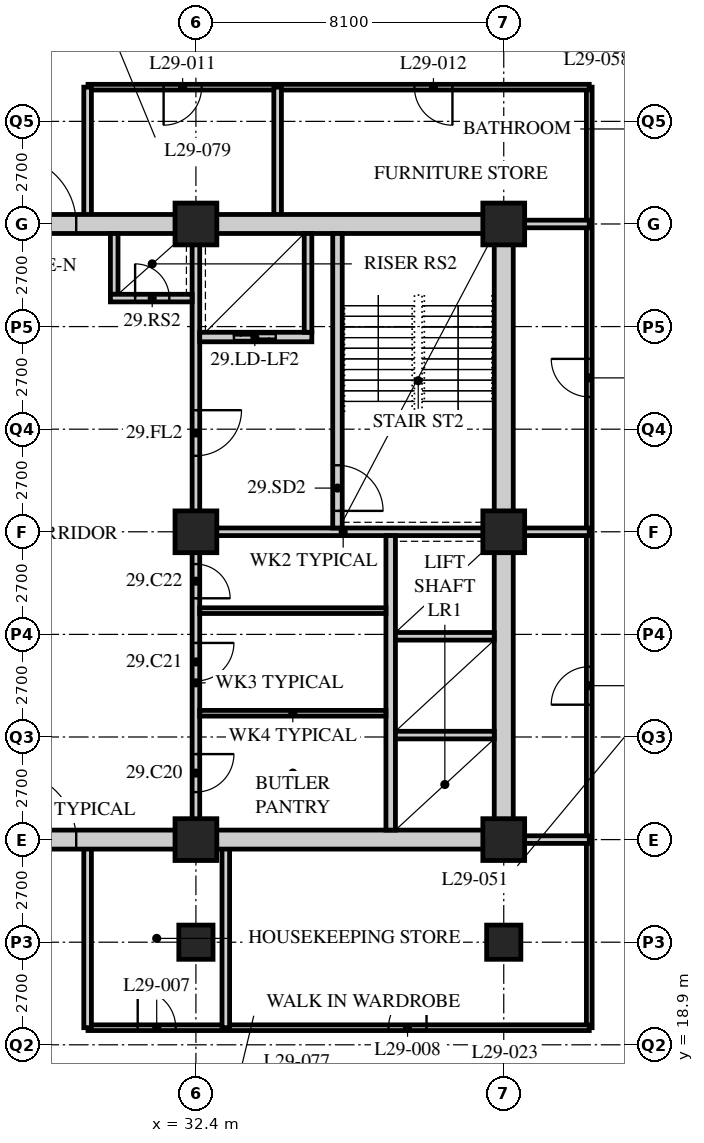
"""IFC4 building model, lengths in metres.
Left out: names, types, materials, properties, quantities, classifications, styles, units other than length and angle.
Written with IfcOpenShell. Run it as: python <this file> out.ifc"""

import sys

from ifc_helpers import new_model, si_unit, direction, frame, frame_2d, origin, origin_2d, place, context, subcontext, project, spatial, rectangle, hollow_rectangle, extrude, element, fill, save


model = new_model("IFC4")
c1 = context("Model", 3, precision=1e-05, world=origin(), true_north=direction((0.0, 1.0)))
c2 = subcontext(c1, "Body", "Model", "MODEL_VIEW")
j1 = project(units=[si_unit("LENGTHUNIT", "METRE"), si_unit("PLANEANGLEUNIT", "RADIAN")], contexts=[c1])
p1 = place(None, origin())
s1 = spatial("IfcSite", under=j1, at=p1, CompositionType="ELEMENT")
p2 = place(p1, origin())
s2 = spatial("IfcBuilding", under=s1, at=p2, CompositionType="ELEMENT")
p3 = place(p2, frame((0.0, 0.0, 117.0)))
s3 = spatial("IfcBuildingStorey", under=s2, at=p3, CompositionType="ELEMENT", Elevation=117.0)
p4 = place(p3, frame((32.4, 21.6, 0.0), z_axis=(0.0, 0.0, 1.0), x_axis=(1.0, 0.0, 0.0)))
e1 = element("IfcColumn", 1, at=p4, inside=s3, PredefinedType="COLUMN", context=c2, shape_type="SweptSolid", body=[
    extrude(hollow_rectangle(XDim=0.9, YDim=0.9, WallThickness=0.09, at=origin_2d()), origin(), (0.0, 0.0, 1.0), 3.4),
])
for number, where, z_axis, x_axis in (
    (2, (32.4, 24.3, 0.0), (0.0, 0.0, 1.0), (1.0, 0.0, 0.0)),
    (3, (32.4, 32.4, 0.0), (0.0, 0.0, 1.0), (1.0, 0.0, 0.0)),
    (4, (32.4, 40.5, 0.0), (0.0, 0.0, 1.0), (1.0, 0.0, 0.0)),
):
    element("IfcColumn", number, at=place(p3, frame(where, z_axis=z_axis, x_axis=x_axis)), inside=s3, PredefinedType="COLUMN", context=c2, shape_type="SweptSolid", body=[
        extrude(hollow_rectangle(XDim=1.1, YDim=1.1, WallThickness=0.1, at=origin_2d()), origin(), (0.0, 0.0, 1.0), 3.4),
    ])
p5 = place(p3, frame((40.5, 21.6, 0.0), z_axis=(0.0, 0.0, 1.0), x_axis=(1.0, 0.0, 0.0)))
e5 = element("IfcColumn", 5, at=p5, inside=s3, PredefinedType="COLUMN", context=c2, shape_type="SweptSolid", body=[
    extrude(hollow_rectangle(XDim=0.9, YDim=0.9, WallThickness=0.09, at=origin_2d()), origin(), (0.0, 0.0, 1.0), 3.4),
])
for number, where, z_axis, x_axis in (
    (6, (40.5, 24.3, 0.0), (0.0, 0.0, 1.0), (1.0, 0.0, 0.0)),
    (7, (40.5, 32.4, 0.0), (0.0, 0.0, 1.0), (1.0, 0.0, 0.0)),
    (8, (40.5, 40.5, 0.0), (0.0, 0.0, 1.0), (1.0, 0.0, 0.0)),
):
    element("IfcColumn", number, at=place(p3, frame(where, z_axis=z_axis, x_axis=x_axis)), inside=s3, PredefinedType="COLUMN", context=c2, shape_type="SweptSolid", body=[
        extrude(hollow_rectangle(XDim=1.1, YDim=1.1, WallThickness=0.1, at=origin_2d()), origin(), (0.0, 0.0, 1.0), 3.4),
    ])
p6 = place(p3, frame((42.75, 19.35, 0.0), z_axis=(0.0, 0.0, 1.0), x_axis=(0.0, 1.0, 0.0)))
e9 = element("IfcWall", 9, at=p6, inside=s3, PredefinedType="PARTITIONING", context=c2, shape_type="SweptSolid", body=[
    extrude(rectangle(XDim=24.75, YDim=0.15, at=frame_2d((12.375, 0.0))), origin(), (0.0, 0.0, 1.0), 3.19),
])
p7 = place(p6, frame((8.5, 0.0, 0.0)))
e10 = element("IfcOpeningElement", 10, at=p7, cuts=e9, PredefinedType="OPENING", context=c2, shape_type="SweptSolid", body=[
    extrude(rectangle(XDim=1.0, YDim=2.1, at=frame_2d((0.5, 1.05))), frame((0.0, 0.085, 0.0), z_axis=(0.0, -1.0, 0.0), x_axis=(1.0, 0.0, 0.0)), (0.0, 0.0, 1.0), 0.17),
])
p8 = place(p6, frame((16.6, 0.0, 0.0)))
e11 = element("IfcOpeningElement", 11, at=p8, cuts=e9, PredefinedType="OPENING", context=c2, shape_type="SweptSolid", body=[
    extrude(rectangle(XDim=1.0, YDim=2.1, at=frame_2d((0.5, 1.05))), frame((0.0, 0.085, 0.0), z_axis=(0.0, -1.0, 0.0), x_axis=(1.0, 0.0, 0.0)), (0.0, 0.0, 1.0), 0.17),
])
p9 = place(p3, frame((42.75, 44.1, 0.0), z_axis=(0.0, 0.0, 1.0), x_axis=(-1.0, 0.0, 0.0)))
e12 = element("IfcWall", 12, at=p9, inside=s3, PredefinedType="PARTITIONING", context=c2, shape_type="SweptSolid", body=[
    extrude(rectangle(XDim=13.19, YDim=0.15, at=frame_2d((6.595, 0.0))), origin(), (0.0, 0.0, 1.0), 3.19),
])
p10 = place(p9, frame((10.2, 0.0, 0.0)))
e13 = element("IfcOpeningElement", 13, at=p10, cuts=e12, PredefinedType="OPENING", context=c2, shape_type="SweptSolid", body=[
    extrude(rectangle(XDim=1.0, YDim=2.1, at=frame_2d((0.5, 1.05))), frame((0.0, 0.085, 0.0), z_axis=(0.0, -1.0, 0.0), x_axis=(1.0, 0.0, 0.0)), (0.0, 0.0, 1.0), 0.17),
])
p11 = place(p9, frame((3.6, 0.0, 0.0)))
e14 = element("IfcOpeningElement", 14, at=p11, cuts=e12, PredefinedType="OPENING", context=c2, shape_type="SweptSolid", body=[
    extrude(rectangle(XDim=1.0, YDim=2.1, at=frame_2d((0.5, 1.05))), frame((0.0, 0.085, 0.0), z_axis=(0.0, -1.0, 0.0), x_axis=(1.0, 0.0, 0.0)), (0.0, 0.0, 1.0), 0.17),
])
p12 = place(p3, frame((29.56, 19.35, 0.0), z_axis=(0.0, 0.0, 1.0), x_axis=(1.0, 0.0, 0.0)))
e15 = element("IfcWall", 15, at=p12, inside=s3, PredefinedType="PARTITIONING", context=c2, shape_type="SweptSolid", body=[
    extrude(rectangle(XDim=13.19, YDim=0.15, at=frame_2d((6.595, 0.0))), origin(), (0.0, 0.0, 1.0), 3.19),
])
p13 = place(p12, frame((1.308, 0.0, 0.0)))
e16 = element("IfcOpeningElement", 16, at=p13, cuts=e15, PredefinedType="OPENING", context=c2, shape_type="SweptSolid", body=[
    extrude(rectangle(XDim=1.0, YDim=2.1, at=frame_2d((0.5, 1.05))), frame((0.0, 0.085, 0.0), z_axis=(0.0, -1.0, 0.0), x_axis=(1.0, 0.0, 0.0)), (0.0, 0.0, 1.0), 0.17),
])
p14 = place(p12, frame((7.908, 0.0, 0.0)))
e17 = element("IfcOpeningElement", 17, at=p14, cuts=e15, PredefinedType="OPENING", context=c2, shape_type="SweptSolid", body=[
    extrude(rectangle(XDim=1.0, YDim=2.1, at=frame_2d((0.5, 1.05))), frame((0.0, 0.085, 0.0), z_axis=(0.0, -1.0, 0.0), x_axis=(1.0, 0.0, 0.0)), (0.0, 0.0, 1.0), 0.17),
])
p15 = place(p3, frame((40.5, 32.4, 0.0), z_axis=(0.0, 0.0, 1.0), x_axis=(1.0, 0.0, 0.0)))
e18 = element("IfcWall", 18, at=p15, inside=s3, PredefinedType="SOLIDWALL", context=c2, shape_type="SweptSolid", body=[
    extrude(rectangle(XDim=2.25, YDim=0.2, at=frame_2d((1.125, 0.0))), origin(), (0.0, 0.0, 1.0), 3.19),
])
for number, where, z_axis, x_axis in (
    (19, (33.186, 19.35, 0.0), (0.0, 0.0, 1.0), (0.0, 1.0, 0.0)),
    (20, (29.55, 19.35, 0.0), (0.0, 0.0, 1.0), (0.0, 1.0, 0.0)),
):
    element("IfcWall", number, at=place(p3, frame(where, z_axis=z_axis, x_axis=x_axis)), inside=s3, PredefinedType="SOLIDWALL", context=c2, shape_type="SweptSolid", body=[
        extrude(rectangle(XDim=4.95, YDim=0.2, at=frame_2d((2.475, 0.0))), origin(), (0.0, 0.0, 1.0), 3.19),
    ])
for number, where, z_axis, x_axis in (
    (21, (34.55, 44.1, 0.0), (0.0, 0.0, 1.0), (0.0, -1.0, 0.0)),
    (22, (29.55, 40.5, 0.0), (0.0, 0.0, 1.0), (0.0, 1.0, 0.0)),
):
    element("IfcWall", number, at=place(p3, frame(where, z_axis=z_axis, x_axis=x_axis)), inside=s3, PredefinedType="SOLIDWALL", context=c2, shape_type="SweptSolid", body=[
        extrude(rectangle(XDim=3.6, YDim=0.2, at=frame_2d((1.8, 0.0))), origin(), (0.0, 0.0, 1.0), 3.19),
    ])
for number, where, z_axis, x_axis in (
    (23, (40.5, 24.3, 0.0), (0.0, 0.0, 1.0), (1.0, 0.0, 0.0)),
    (24, (40.5, 40.5, 0.0), (0.0, 0.0, 1.0), (1.0, 0.0, 0.0)),
):
    element("IfcWall", number, at=place(p3, frame(where, z_axis=z_axis, x_axis=x_axis)), inside=s3, PredefinedType="SOLIDWALL", context=c2, shape_type="SweptSolid", body=[
        extrude(rectangle(XDim=2.25, YDim=0.2, at=frame_2d((1.125, 0.0))), origin(), (0.0, 0.0, 1.0), 3.19),
    ])
p16 = place(p3, frame((15.95, 24.3, 0.0), z_axis=(0.0, 0.0, 1.0), x_axis=(1.0, 0.0, 0.0)))
e25 = element("IfcWall", 25, at=p16, inside=s3, PredefinedType="SOLIDWALL", context=c2, shape_type="SweptSolid", body=[
    extrude(rectangle(XDim=24.8, YDim=0.5, at=frame_2d((12.4, 0.0))), origin(), (0.0, 0.0, 1.0), 2.54),
])
p17 = place(p16, frame((11.5, 0.0, 0.0)))
e26 = element("IfcOpeningElement", 26, at=p17, cuts=e25, PredefinedType="OPENING", context=c2, shape_type="SweptSolid", body=[
    extrude(rectangle(XDim=1.8, YDim=2.4, at=frame_2d((0.9, 1.2))), frame((0.0, 0.26, 0.0), z_axis=(0.0, -1.0, 0.0), x_axis=(1.0, 0.0, 0.0)), (0.0, 0.0, 1.0), 0.52),
])
p18 = place(p3, frame((15.95, 40.5, 0.0), z_axis=(0.0, 0.0, 1.0), x_axis=(1.0, 0.0, 0.0)))
e27 = element("IfcWall", 27, at=p18, inside=s3, PredefinedType="SOLIDWALL", context=c2, shape_type="SweptSolid", body=[
    extrude(rectangle(XDim=24.8, YDim=0.5, at=frame_2d((12.4, 0.0))), origin(), (0.0, 0.0, 1.0), 2.54),
])
p19 = place(p18, frame((11.5, 0.0, 0.0)))
e28 = element("IfcOpeningElement", 28, at=p19, cuts=e27, PredefinedType="OPENING", context=c2, shape_type="SweptSolid", body=[
    extrude(rectangle(XDim=1.8, YDim=2.4, at=frame_2d((0.9, 1.2))), frame((0.0, 0.26, 0.0), z_axis=(0.0, -1.0, 0.0), x_axis=(1.0, 0.0, 0.0)), (0.0, 0.0, 1.0), 0.52),
])
p20 = place(p3, frame((40.5, 24.55, 0.0), z_axis=(0.0, 0.0, 1.0), x_axis=(0.0, 1.0, 0.0)))
e29 = element("IfcWall", 29, at=p20, inside=s3, PredefinedType="SOLIDWALL", context=c2, shape_type="SweptSolid", body=[
    extrude(rectangle(XDim=15.7, YDim=0.5, at=frame_2d((7.85, 0.0))), origin(), (0.0, 0.0, 1.0), 2.578),
])
p21 = place(p3, frame((32.3, 32.4, 0.0), z_axis=(0.0, 0.0, 1.0), x_axis=(1.0, 0.0, 0.0)))
e30 = element("IfcWall", 30, at=p21, inside=s3, PredefinedType="SOLIDWALL", context=c2, shape_type="SweptSolid", body=[
    extrude(rectangle(XDim=7.95, YDim=0.2, at=frame_2d((3.975, 0.0))), origin(), (0.0, 0.0, 1.0), 2.578),
])
p22 = place(p3, frame((32.4, 32.5, 0.0), z_axis=(0.0, 0.0, 1.0), x_axis=(0.0, 1.0, 0.0)))
e31 = element("IfcWall", 31, at=p22, inside=s3, PredefinedType="SOLIDWALL", context=c2, shape_type="SweptSolid", body=[
    extrude(rectangle(XDim=7.75, YDim=0.2, at=frame_2d((3.875, 0.0))), origin(), (0.0, 0.0, 1.0), 2.578),
])
p23 = place(p22, frame((1.9, 0.0, 0.0)))
e32 = element("IfcOpeningElement", 32, at=p23, cuts=e31, PredefinedType="OPENING", context=c2, shape_type="SweptSolid", body=[
    extrude(rectangle(XDim=1.2, YDim=2.1, at=frame_2d((0.6, 1.05))), frame((0.0, 0.11, 0.0), z_axis=(0.0, -1.0, 0.0), x_axis=(1.0, 0.0, 0.0)), (0.0, 0.0, 1.0), 0.22),
])
p24 = place(p3, frame((37.525, 24.55, 0.0), z_axis=(0.0, 0.0, 1.0), x_axis=(0.0, 1.0, 0.0)))
e33 = element("IfcWall", 33, at=p24, inside=s3, PredefinedType="SOLIDWALL", context=c2, shape_type="SweptSolid", body=[
    extrude(rectangle(XDim=7.75, YDim=0.25, at=frame_2d((3.875, 0.0))), origin(), (0.0, 0.0, 1.0), 3.19),
])
for number, where, z_axis, x_axis in (
    (34, (37.65, 27.05, 0.0), (0.0, 0.0, 1.0), (1.0, 0.0, 0.0)),
    (35, (37.65, 29.65, 0.0), (0.0, 0.0, 1.0), (1.0, 0.0, 0.0)),
):
    element("IfcWall", number, at=place(p3, frame(where, z_axis=z_axis, x_axis=x_axis)), inside=s3, PredefinedType="SOLIDWALL", context=c2, shape_type="SweptSolid", body=[
        extrude(rectangle(XDim=2.6, YDim=0.2, at=frame_2d((1.3, 0.0))), origin(), (0.0, 0.0, 1.0), 3.19),
    ])
p25 = place(p3, frame((36.125, 32.5, 0.0), z_axis=(0.0, 0.0, 1.0), x_axis=(0.0, 1.0, 0.0)))
e36 = element("IfcWall", 36, at=p25, inside=s3, PredefinedType="SOLIDWALL", context=c2, shape_type="SweptSolid", body=[
    extrude(rectangle(XDim=7.75, YDim=0.25, at=frame_2d((3.875, 0.0))), origin(), (0.0, 0.0, 1.0), 3.19),
])
p26 = place(p25, frame((0.45, 0.0, 0.0)))
e37 = element("IfcOpeningElement", 37, at=p26, cuts=e36, PredefinedType="OPENING", context=c2, shape_type="SweptSolid", body=[
    extrude(rectangle(XDim=1.2, YDim=2.1, at=frame_2d((0.6, 1.05))), frame((0.0, 0.135, 0.0), z_axis=(0.0, -1.0, 0.0), x_axis=(1.0, 0.0, 0.0)), (0.0, 0.0, 1.0), 0.27),
])
p27 = place(p3, frame((32.5, 37.525, 0.0), z_axis=(0.0, 0.0, 1.0), x_axis=(1.0, 0.0, 0.0)))
e38 = element("IfcWall", 38, at=p27, inside=s3, PredefinedType="SOLIDWALL", context=c2, shape_type="SweptSolid", body=[
    extrude(rectangle(XDim=2.95, YDim=0.25, at=frame_2d((1.475, 0.0))), origin(), (0.0, 0.0, 1.0), 3.19),
])
p28 = place(p27, frame((0.9, 0.0, 0.0)))
e39 = element("IfcOpeningElement", 39, at=p28, cuts=e38, PredefinedType="OPENING", context=c2, shape_type="SweptSolid", body=[
    extrude(rectangle(XDim=1.1, YDim=2.4, at=frame_2d((0.55, 1.2))), frame((0.0, 0.135, 0.0), z_axis=(0.0, -1.0, 0.0), x_axis=(1.0, 0.0, 0.0)), (0.0, 0.0, 1.0), 0.27),
])
p29 = place(p3, frame((35.35, 37.65, 0.0), z_axis=(0.0, 0.0, 1.0), x_axis=(0.0, 1.0, 0.0)))
e40 = element("IfcWall", 40, at=p29, inside=s3, PredefinedType="SOLIDWALL", context=c2, shape_type="SweptSolid", body=[
    extrude(rectangle(XDim=2.6, YDim=0.2, at=frame_2d((1.3, 0.0))), origin(), (0.0, 0.0, 1.0), 3.19),
])
p30 = place(p3, frame((30.25, 38.65, 0.0), z_axis=(0.0, 0.0, 1.0), x_axis=(0.0, 1.0, 0.0)))
e41 = element("IfcWall", 41, at=p30, inside=s3, PredefinedType="SOLIDWALL", context=c2, shape_type="SweptSolid", body=[
    extrude(rectangle(XDim=1.6, YDim=0.2, at=frame_2d((0.8, 0.0))), origin(), (0.0, 0.0, 1.0), 3.19),
])
p31 = place(p3, frame((30.15, 38.55, 0.0), z_axis=(0.0, 0.0, 1.0), x_axis=(1.0, 0.0, 0.0)))
e42 = element("IfcWall", 42, at=p31, inside=s3, PredefinedType="SOLIDWALL", context=c2, shape_type="SweptSolid", body=[
    extrude(rectangle(XDim=2.15, YDim=0.2, at=frame_2d((1.075, 0.0))), origin(), (0.0, 0.0, 1.0), 3.19),
])
p32 = place(p31, frame((0.65, 0.0, 0.0)))
e43 = element("IfcOpeningElement", 43, at=p32, cuts=e42, PredefinedType="OPENING", context=c2, shape_type="SweptSolid", body=[
    extrude(rectangle(XDim=0.9, YDim=2.1, at=frame_2d((0.45, 1.05))), frame((0.0, 0.11, 0.0), z_axis=(0.0, -1.0, 0.0), x_axis=(1.0, 0.0, 0.0)), (0.0, 0.0, 1.0), 0.22),
])
p33 = place(p3, frame((32.4, 24.55, 0.0), z_axis=(0.0, 0.0, 1.0), x_axis=(0.0, 1.0, 0.0)))
e44 = element("IfcWall", 44, at=p33, inside=s3, PredefinedType="PARTITIONING", context=c2, shape_type="SweptSolid", body=[
    extrude(rectangle(XDim=7.75, YDim=0.2, at=frame_2d((3.875, 0.0))), origin(), (0.0, 0.0, 1.0), 2.578),
])
p34 = place(p33, frame((1.0, 0.0, 0.0)))
e45 = element("IfcOpeningElement", 45, at=p34, cuts=e44, PredefinedType="OPENING", context=c2, shape_type="SweptSolid", body=[
    extrude(rectangle(XDim=1.0, YDim=2.1, at=frame_2d((0.5, 1.05))), frame((0.0, 0.11, 0.0), z_axis=(0.0, -1.0, 0.0), x_axis=(1.0, 0.0, 0.0)), (0.0, 0.0, 1.0), 0.22),
])
p35 = place(p33, frame((3.925, 0.0, 0.0)))
e46 = element("IfcOpeningElement", 46, at=p35, cuts=e44, PredefinedType="OPENING", context=c2, shape_type="SweptSolid", body=[
    extrude(rectangle(XDim=1.0, YDim=2.1, at=frame_2d((0.5, 1.05))), frame((0.0, 0.11, 0.0), z_axis=(0.0, -1.0, 0.0), x_axis=(1.0, 0.0, 0.0)), (0.0, 0.0, 1.0), 0.22),
])
p36 = place(p33, frame((6.1, 0.0, 0.0)))
e47 = element("IfcOpeningElement", 47, at=p36, cuts=e44, PredefinedType="OPENING", context=c2, shape_type="SweptSolid", body=[
    extrude(rectangle(XDim=0.9, YDim=2.1, at=frame_2d((0.45, 1.05))), frame((0.0, 0.11, 0.0), z_axis=(0.0, -1.0, 0.0), x_axis=(1.0, 0.0, 0.0)), (0.0, 0.0, 1.0), 0.22),
])
for number, where, z_axis, x_axis in (
    (48, (32.5, 27.625, 0.0), (0.0, 0.0, 1.0), (1.0, 0.0, 0.0)),
    (49, (32.5, 30.325, 0.0), (0.0, 0.0, 1.0), (1.0, 0.0, 0.0)),
):
    element("IfcWall", number, at=place(p3, frame(where, z_axis=z_axis, x_axis=x_axis)), inside=s3, PredefinedType="PARTITIONING", context=c2, shape_type="SweptSolid", body=[
        extrude(rectangle(XDim=4.9, YDim=0.15, at=frame_2d((2.45, 0.0))), origin(), (0.0, 0.0, 1.0), 3.19),
    ])
p37 = place(p7, origin())
e50 = element("IfcDoor", 50, at=p37, inside=s3, OperationType="SINGLE_SWING_LEFT", PredefinedType="DOOR", context=c2, shape_type="SweptSolid", body=[
    extrude(rectangle(XDim=1.0, YDim=2.1, at=frame_2d((0.5, 1.05))), frame((0.0, 0.025, 0.0), z_axis=(0.0, -1.0, 0.0), x_axis=(1.0, 0.0, 0.0)), (0.0, 0.0, 1.0), 0.05),
])
fill(e10, e50)
p38 = place(p8, origin())
e51 = element("IfcDoor", 51, at=p38, inside=s3, OperationType="SINGLE_SWING_RIGHT", PredefinedType="DOOR", context=c2, shape_type="SweptSolid", body=[
    extrude(rectangle(XDim=1.0, YDim=2.1, at=frame_2d((0.5, 1.05))), frame((0.0, 0.025, 0.0), z_axis=(0.0, -1.0, 0.0), x_axis=(1.0, 0.0, 0.0)), (0.0, 0.0, 1.0), 0.05),
])
fill(e11, e51)
p39 = place(p13, origin())
e52 = element("IfcDoor", 52, at=p39, inside=s3, OperationType="SINGLE_SWING_LEFT", PredefinedType="DOOR", context=c2, shape_type="SweptSolid", body=[
    extrude(rectangle(XDim=1.0, YDim=2.1, at=frame_2d((0.5, 1.05))), frame((0.0, 0.025, 0.0), z_axis=(0.0, -1.0, 0.0), x_axis=(1.0, 0.0, 0.0)), (0.0, 0.0, 1.0), 0.05),
])
fill(e16, e52)
p40 = place(p14, origin())
e53 = element("IfcDoor", 53, at=p40, inside=s3, OperationType="SINGLE_SWING_RIGHT", PredefinedType="DOOR", context=c2, shape_type="SweptSolid", body=[
    extrude(rectangle(XDim=1.0, YDim=2.1, at=frame_2d((0.5, 1.05))), frame((0.0, 0.025, 0.0), z_axis=(0.0, -1.0, 0.0), x_axis=(1.0, 0.0, 0.0)), (0.0, 0.0, 1.0), 0.05),
])
fill(e17, e53)
p41 = place(p10, origin())
e54 = element("IfcDoor", 54, at=p41, inside=s3, OperationType="SINGLE_SWING_RIGHT", PredefinedType="DOOR", context=c2, shape_type="SweptSolid", body=[
    extrude(rectangle(XDim=1.0, YDim=2.1, at=frame_2d((0.5, 1.05))), frame((0.0, 0.025, 0.0), z_axis=(0.0, -1.0, 0.0), x_axis=(1.0, 0.0, 0.0)), (0.0, 0.0, 1.0), 0.05),
])
fill(e13, e54)
p42 = place(p11, origin())
e55 = element("IfcDoor", 55, at=p42, inside=s3, OperationType="SINGLE_SWING_LEFT", PredefinedType="DOOR", context=c2, shape_type="SweptSolid", body=[
    extrude(rectangle(XDim=1.0, YDim=2.1, at=frame_2d((0.5, 1.05))), frame((0.0, 0.025, 0.0), z_axis=(0.0, -1.0, 0.0), x_axis=(1.0, 0.0, 0.0)), (0.0, 0.0, 1.0), 0.05),
])
fill(e14, e55)
p43 = place(p34, origin())
e56 = element("IfcDoor", 56, at=p43, inside=s3, OperationType="SINGLE_SWING_LEFT", PredefinedType="DOOR", context=c2, shape_type="SweptSolid", body=[
    extrude(rectangle(XDim=1.0, YDim=2.1, at=frame_2d((0.5, 1.05))), frame((0.0, 0.025, 0.0), z_axis=(0.0, -1.0, 0.0), x_axis=(1.0, 0.0, 0.0)), (0.0, 0.0, 1.0), 0.05),
])
fill(e45, e56)
p44 = place(p35, origin())
e57 = element("IfcDoor", 57, at=p44, inside=s3, OperationType="SINGLE_SWING_LEFT", PredefinedType="DOOR", context=c2, shape_type="SweptSolid", body=[
    extrude(rectangle(XDim=1.0, YDim=2.1, at=frame_2d((0.5, 1.05))), frame((0.0, 0.025, 0.0), z_axis=(0.0, -1.0, 0.0), x_axis=(1.0, 0.0, 0.0)), (0.0, 0.0, 1.0), 0.05),
])
fill(e46, e57)
p45 = place(p36, origin())
e58 = element("IfcDoor", 58, at=p45, inside=s3, OperationType="SINGLE_SWING_RIGHT", PredefinedType="DOOR", context=c2, shape_type="SweptSolid", body=[
    extrude(rectangle(XDim=0.9, YDim=2.1, at=frame_2d((0.45, 1.05))), frame((0.0, 0.025, 0.0), z_axis=(0.0, -1.0, 0.0), x_axis=(1.0, 0.0, 0.0)), (0.0, 0.0, 1.0), 0.05),
])
fill(e47, e58)
p46 = place(p26, origin())
e59 = element("IfcDoor", 59, at=p46, inside=s3, OperationType="SINGLE_SWING_RIGHT", PredefinedType="DOOR", context=c2, shape_type="SweptSolid", body=[
    extrude(rectangle(XDim=1.2, YDim=2.1, at=frame_2d((0.6, 1.05))), frame((0.0, 0.025, 0.0), z_axis=(0.0, -1.0, 0.0), x_axis=(1.0, 0.0, 0.0)), (0.0, 0.0, 1.0), 0.05),
])
fill(e37, e59)
p47 = place(p23, origin())
e60 = element("IfcDoor", 60, at=p47, inside=s3, OperationType="SINGLE_SWING_LEFT", PredefinedType="DOOR", context=c2, shape_type="SweptSolid", body=[
    extrude(rectangle(XDim=1.2, YDim=2.1, at=frame_2d((0.6, 1.05))), frame((0.0, 0.025, 0.0), z_axis=(0.0, -1.0, 0.0), x_axis=(1.0, 0.0, 0.0)), (0.0, 0.0, 1.0), 0.05),
])
fill(e32, e60)
p48 = place(p32, origin())
e61 = element("IfcDoor", 61, at=p48, inside=s3, OperationType="SINGLE_SWING_LEFT", PredefinedType="DOOR", context=c2, shape_type="SweptSolid", body=[
    extrude(rectangle(XDim=0.9, YDim=2.1, at=frame_2d((0.45, 1.05))), frame((0.0, 0.025, 0.0), z_axis=(0.0, -1.0, 0.0), x_axis=(1.0, 0.0, 0.0)), (0.0, 0.0, 1.0), 0.05),
])
fill(e43, e61)
p49 = place(p28, origin())
e62 = element("IfcDoor", 62, at=p49, inside=s3, OperationType="DOUBLE_DOOR_SLIDING", PredefinedType="DOOR", context=c2, shape_type="SweptSolid", body=[
    extrude(rectangle(XDim=1.1, YDim=2.4, at=frame_2d((0.55, 1.2))), frame((0.0, 0.025, 0.0), z_axis=(0.0, -1.0, 0.0), x_axis=(1.0, 0.0, 0.0)), (0.0, 0.0, 1.0), 0.05),
])
fill(e39, e62)
p50 = place(p17, origin())
e63 = element("IfcDoor", 63, at=p50, inside=s3, OperationType="DOUBLE_DOOR_SINGLE_SWING", PredefinedType="DOOR", context=c2, shape_type="SweptSolid", body=[
    extrude(rectangle(XDim=1.8, YDim=2.4, at=frame_2d((0.9, 1.2))), frame((0.0, 0.025, 0.0), z_axis=(0.0, -1.0, 0.0), x_axis=(1.0, 0.0, 0.0)), (0.0, 0.0, 1.0), 0.05),
])
fill(e26, e63)
p51 = place(p19, origin())
e64 = element("IfcDoor", 64, at=p51, inside=s3, OperationType="DOUBLE_DOOR_SINGLE_SWING", PredefinedType="DOOR", context=c2, shape_type="SweptSolid", body=[
    extrude(rectangle(XDim=1.8, YDim=2.4, at=frame_2d((0.9, 1.2))), frame((0.0, 0.025, 0.0), z_axis=(0.0, -1.0, 0.0), x_axis=(1.0, 0.0, 0.0)), (0.0, 0.0, 1.0), 0.05),
])
fill(e28, e64)
save(model, sys.argv[1])
